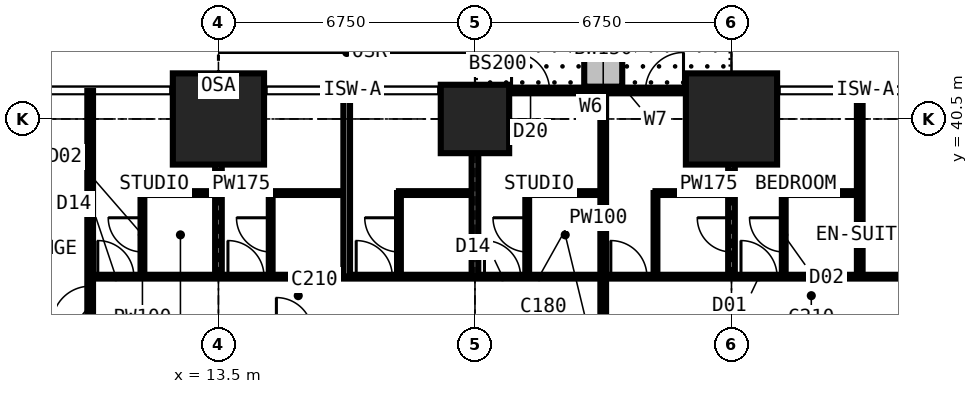
"""IFC4 building model, lengths in metres.
Left out: names, types, materials, properties, quantities, classifications, styles, units other than length and angle.
Written with IfcOpenShell. Run it as: python <this file> out.ifc"""

import sys

from ifc_helpers import new_model, si_unit, direction, frame, frame_2d, origin, origin_2d, place, context, subcontext, project, spatial, rectangle, extrude, element, fill, save


model = new_model("IFC4")
c1 = context("Model", 3, precision=1e-05, world=origin(), true_north=direction((0.0, 1.0)))
c2 = subcontext(c1, "Body", "Model", "MODEL_VIEW")
j1 = project(units=[si_unit("LENGTHUNIT", "METRE"), si_unit("PLANEANGLEUNIT", "RADIAN")], contexts=[c1])
p1 = place(None, origin())
s1 = spatial("IfcSite", under=j1, at=p1, CompositionType="ELEMENT")
p2 = place(p1, origin())
s2 = spatial("IfcBuilding", under=s1, at=p2, CompositionType="ELEMENT")
p3 = place(p2, frame((0.0, 0.0, 72.0)))
s3 = spatial("IfcBuildingStorey", under=s2, at=p3, CompositionType="ELEMENT", Elevation=72.0)
p4 = place(p3, frame((13.5, 40.5, 0.0), z_axis=(0.0, 0.0, 1.0), x_axis=(1.0, 0.0, 0.0)))
e1 = element("IfcColumn", 1, at=p4, inside=s3, PredefinedType="COLUMN", context=c2, shape_type="SweptSolid", body=[
    extrude(rectangle(XDim=2.4, YDim=2.4, at=origin_2d()), origin(), (0.0, 0.0, 1.0), 3.6),
])
p5 = place(p3, frame((20.25, 40.5, 0.0), z_axis=(0.0, 0.0, 1.0), x_axis=(1.0, 0.0, 0.0)))
e2 = element("IfcColumn", 2, at=p5, inside=s3, PredefinedType="COLUMN", context=c2, shape_type="SweptSolid", body=[
    extrude(rectangle(XDim=1.8, YDim=1.8, at=origin_2d()), origin(), (0.0, 0.0, 1.0), 3.6),
])
p6 = place(p3, frame((27.0, 40.5, 0.0), z_axis=(0.0, 0.0, 1.0), x_axis=(1.0, 0.0, 0.0)))
e3 = element("IfcColumn", 3, at=p6, inside=s3, PredefinedType="COLUMN", context=c2, shape_type="SweptSolid", body=[
    extrude(rectangle(XDim=2.4, YDim=2.4, at=origin_2d()), origin(), (0.0, 0.0, 1.0), 3.6),
])
p7 = place(p3, frame((20.25, 41.25, 0.0), z_axis=(0.0, 0.0, 1.0), x_axis=(1.0, 0.0, 0.0)))
e4 = element("IfcWall", 4, at=p7, inside=s3, PredefinedType="SOLIDWALL", context=c2, shape_type="SweptSolid", body=[
    extrude(rectangle(XDim=6.75, YDim=0.15, at=frame_2d((3.375, 0.0))), origin(), (0.0, 0.0, 1.0), 3.3),
])
p8 = place(p7, frame((0.962, 0.0, 0.0)))
e5 = element("IfcOpeningElement", 5, at=p8, cuts=e4, PredefinedType="OPENING", context=c2, shape_type="SweptSolid", body=[
    extrude(rectangle(XDim=1.0, YDim=2.2, at=frame_2d((0.5, 1.1))), frame((0.0, 0.085, 0.0), z_axis=(0.0, -1.0, 0.0), x_axis=(1.0, 0.0, 0.0)), (0.0, 0.0, 1.0), 0.17),
])
p9 = place(p7, frame((2.025, 0.0, 0.9)))
e6 = element("IfcOpeningElement", 6, at=p9, cuts=e4, PredefinedType="OPENING", context=c2, shape_type="SweptSolid", body=[
    extrude(rectangle(XDim=1.2, YDim=1.8, at=frame_2d((0.6, 0.9))), frame((0.0, 0.085, 0.0), z_axis=(0.0, -1.0, 0.0), x_axis=(1.0, 0.0, 0.0)), (0.0, 0.0, 1.0), 0.17),
])
p10 = place(p7, frame((4.488, 0.0, 0.0)))
e7 = element("IfcOpeningElement", 7, at=p10, cuts=e4, PredefinedType="OPENING", context=c2, shape_type="SweptSolid", body=[
    extrude(rectangle(XDim=1.0, YDim=2.2, at=frame_2d((0.5, 1.1))), frame((0.0, 0.085, 0.0), z_axis=(0.0, -1.0, 0.0), x_axis=(1.0, 0.0, 0.0)), (0.0, 0.0, 1.0), 0.17),
])
p11 = place(p7, frame((3.525, 0.0, 0.9)))
e8 = element("IfcOpeningElement", 8, at=p11, cuts=e4, PredefinedType="OPENING", context=c2, shape_type="SweptSolid", body=[
    extrude(rectangle(XDim=0.9, YDim=1.8, at=frame_2d((0.45, 0.9))), frame((0.0, 0.085, 0.0), z_axis=(0.0, -1.0, 0.0), x_axis=(1.0, 0.0, 0.0)), (0.0, 0.0, 1.0), 0.17),
])
p12 = place(p3, frame((23.625, 41.35, 0.0), z_axis=(0.0, 0.0, 1.0), x_axis=(0.0, 1.0, 0.0)))
e9 = element("IfcWall", 9, at=p12, inside=s3, PredefinedType="USERDEFINED", context=c2, shape_type="SweptSolid", body=[
    extrude(rectangle(XDim=2.2, YDim=1.0, at=frame_2d((1.1, 0.0))), origin(), (0.0, 0.0, 1.0), 0.9),
])
p13 = place(p3, frame((10.125, 30.375, 0.0), z_axis=(0.0, 0.0, 1.0), x_axis=(0.0, 1.0, 0.0)))
e10 = element("IfcWall", 10, at=p13, inside=s3, PredefinedType="PARTITIONING", context=c2, shape_type="SweptSolid", body=[
    extrude(rectangle(XDim=10.859, YDim=0.15, at=frame_2d((5.429, 0.0))), origin(), (0.0, 0.0, 1.0), 3.3),
])
p14 = place(p13, frame((4.725, 0.0, 0.0)))
e11 = element("IfcOpeningElement", 11, at=p14, cuts=e10, PredefinedType="OPENING", context=c2, shape_type="SweptSolid", body=[
    extrude(rectangle(XDim=1.0, YDim=2.2, at=frame_2d((0.5, 1.1))), frame((0.0, 0.085, 0.0), z_axis=(0.0, -1.0, 0.0), x_axis=(1.0, 0.0, 0.0)), (0.0, 0.0, 1.0), 0.17),
])
p15 = place(p3, frame((10.125, 36.35, 0.0), z_axis=(0.0, 0.0, 1.0), x_axis=(1.0, 0.0, 0.0)))
e12 = element("IfcWall", 12, at=p15, inside=s3, PredefinedType="PARTITIONING", context=c2, shape_type="SweptSolid", body=[
    extrude(rectangle(XDim=23.625, YDim=0.1, at=frame_2d((11.812, 0.0))), origin(), (0.0, 0.0, 1.0), 3.3),
])
p16 = place(p15, frame((21.45, 0.0, 0.0)))
e13 = element("IfcOpeningElement", 13, at=p16, cuts=e12, PredefinedType="OPENING", context=c2, shape_type="SweptSolid", body=[
    extrude(rectangle(XDim=1.0, YDim=2.2, at=frame_2d((0.5, 1.1))), frame((0.0, 0.06, 0.0), z_axis=(0.0, -1.0, 0.0), x_axis=(1.0, 0.0, 0.0)), (0.0, 0.0, 1.0), 0.12),
])
p17 = place(p15, frame((17.125, 0.0, 0.0)))
e14 = element("IfcOpeningElement", 14, at=p17, cuts=e12, PredefinedType="OPENING", context=c2, shape_type="SweptSolid", body=[
    extrude(rectangle(XDim=0.95, YDim=2.2, at=frame_2d((0.475, 1.1))), frame((0.0, 0.06, 0.0), z_axis=(0.0, -1.0, 0.0), x_axis=(1.0, 0.0, 0.0)), (0.0, 0.0, 1.0), 0.12),
])
p18 = place(p15, frame((13.7, 0.0, 0.0)))
e15 = element("IfcOpeningElement", 15, at=p18, cuts=e12, PredefinedType="OPENING", context=c2, shape_type="SweptSolid", body=[
    extrude(rectangle(XDim=0.95, YDim=2.2, at=frame_2d((0.475, 1.1))), frame((0.0, 0.06, 0.0), z_axis=(0.0, -1.0, 0.0), x_axis=(1.0, 0.0, 0.0)), (0.0, 0.0, 1.0), 0.12),
])
p19 = place(p15, frame((0.2, 0.0, 0.0)))
e16 = element("IfcOpeningElement", 16, at=p19, cuts=e12, PredefinedType="OPENING", context=c2, shape_type="SweptSolid", body=[
    extrude(rectangle(XDim=0.95, YDim=2.2, at=frame_2d((0.475, 1.1))), frame((0.0, 0.06, 0.0), z_axis=(0.0, -1.0, 0.0), x_axis=(1.0, 0.0, 0.0)), (0.0, 0.0, 1.0), 0.12),
])
p20 = place(p15, frame((3.625, 0.0, 0.0)))
e17 = element("IfcOpeningElement", 17, at=p20, cuts=e12, PredefinedType="OPENING", context=c2, shape_type="SweptSolid", body=[
    extrude(rectangle(XDim=0.95, YDim=2.2, at=frame_2d((0.475, 1.1))), frame((0.0, 0.06, 0.0), z_axis=(0.0, -1.0, 0.0), x_axis=(1.0, 0.0, 0.0)), (0.0, 0.0, 1.0), 0.12),
])
p21 = place(p15, frame((7.0, 0.0, 0.0)))
e18 = element("IfcOpeningElement", 18, at=p21, cuts=e12, PredefinedType="OPENING", context=c2, shape_type="SweptSolid", body=[
    extrude(rectangle(XDim=0.95, YDim=2.2, at=frame_2d((0.475, 1.1))), frame((0.0, 0.06, 0.0), z_axis=(0.0, -1.0, 0.0), x_axis=(1.0, 0.0, 0.0)), (0.0, 0.0, 1.0), 0.12),
])
p22 = place(p15, frame((10.375, 0.0, 0.0)))
e19 = element("IfcOpeningElement", 19, at=p22, cuts=e12, PredefinedType="OPENING", context=c2, shape_type="SweptSolid", body=[
    extrude(rectangle(XDim=0.95, YDim=2.2, at=frame_2d((0.475, 1.1))), frame((0.0, 0.06, 0.0), z_axis=(0.0, -1.0, 0.0), x_axis=(1.0, 0.0, 0.0)), (0.0, 0.0, 1.0), 0.12),
])
p23 = place(p3, frame((11.5, 36.35, 0.0), z_axis=(0.0, 0.0, 1.0), x_axis=(0.0, 1.0, 0.0)))
e20 = element("IfcWall", 20, at=p23, inside=s3, PredefinedType="PARTITIONING", context=c2, shape_type="SweptSolid", body=[
    extrude(rectangle(XDim=2.2, YDim=0.1, at=frame_2d((1.1, 0.0))), origin(), (0.0, 0.0, 1.0), 3.3),
])
p24 = place(p23, frame((0.65, 0.0, 0.0)))
e21 = element("IfcOpeningElement", 21, at=p24, cuts=e20, PredefinedType="OPENING", context=c2, shape_type="SweptSolid", body=[
    extrude(rectangle(XDim=0.9, YDim=2.2, at=frame_2d((0.45, 1.1))), frame((0.0, 0.06, 0.0), z_axis=(0.0, -1.0, 0.0), x_axis=(1.0, 0.0, 0.0)), (0.0, 0.0, 1.0), 0.12),
])
p25 = place(p3, frame((11.5, 38.55, 0.0), z_axis=(0.0, 0.0, 1.0), x_axis=(1.0, 0.0, 0.0)))
e22 = element("IfcWall", 22, at=p25, inside=s3, PredefinedType="PARTITIONING", context=c2, shape_type="SweptSolid", body=[
    extrude(rectangle(XDim=2.0, YDim=0.1, at=frame_2d((1.0, 0.0))), origin(), (0.0, 0.0, 1.0), 3.3),
])
p26 = place(p3, frame((13.5, 36.35, 0.0), z_axis=(0.0, 0.0, 1.0), x_axis=(0.0, 1.0, 0.0)))
e23 = element("IfcWall", 23, at=p26, inside=s3, PredefinedType="PARTITIONING", context=c2, shape_type="SweptSolid", body=[
    extrude(rectangle(XDim=4.884, YDim=0.175, at=frame_2d((2.442, 0.0))), origin(), (0.0, 0.0, 1.0), 2.802),
])
p27 = place(p3, frame((14.875, 36.35, 0.0), z_axis=(0.0, 0.0, 1.0), x_axis=(0.0, 1.0, 0.0)))
e24 = element("IfcWall", 24, at=p27, inside=s3, PredefinedType="PARTITIONING", context=c2, shape_type="SweptSolid", body=[
    extrude(rectangle(XDim=2.2, YDim=0.1, at=frame_2d((1.1, 0.0))), origin(), (0.0, 0.0, 1.0), 3.3),
])
p28 = place(p27, frame((0.65, 0.0, 0.0)))
e25 = element("IfcOpeningElement", 25, at=p28, cuts=e24, PredefinedType="OPENING", context=c2, shape_type="SweptSolid", body=[
    extrude(rectangle(XDim=0.9, YDim=2.2, at=frame_2d((0.45, 1.1))), frame((0.0, 0.06, 0.0), z_axis=(0.0, -1.0, 0.0), x_axis=(1.0, 0.0, 0.0)), (0.0, 0.0, 1.0), 0.12),
])
p29 = place(p3, frame((14.875, 38.55, 0.0), z_axis=(0.0, 0.0, 1.0), x_axis=(1.0, 0.0, 0.0)))
e26 = element("IfcWall", 26, at=p29, inside=s3, PredefinedType="PARTITIONING", context=c2, shape_type="SweptSolid", body=[
    extrude(rectangle(XDim=2.0, YDim=0.1, at=frame_2d((1.0, 0.0))), origin(), (0.0, 0.0, 1.0), 3.3),
])
p30 = place(p3, frame((16.875, 36.35, 0.0), z_axis=(0.0, 0.0, 1.0), x_axis=(0.0, 1.0, 0.0)))
e27 = element("IfcWall", 27, at=p30, inside=s3, PredefinedType="PARTITIONING", context=c2, shape_type="SweptSolid", body=[
    extrude(rectangle(XDim=4.884, YDim=0.175, at=frame_2d((2.442, 0.0))), origin(), (0.0, 0.0, 1.0), 3.3),
])
p31 = place(p3, frame((18.25, 36.35, 0.0), z_axis=(0.0, 0.0, 1.0), x_axis=(0.0, 1.0, 0.0)))
e28 = element("IfcWall", 28, at=p31, inside=s3, PredefinedType="PARTITIONING", context=c2, shape_type="SweptSolid", body=[
    extrude(rectangle(XDim=2.2, YDim=0.1, at=frame_2d((1.1, 0.0))), origin(), (0.0, 0.0, 1.0), 3.3),
])
p32 = place(p31, frame((0.65, 0.0, 0.0)))
e29 = element("IfcOpeningElement", 29, at=p32, cuts=e28, PredefinedType="OPENING", context=c2, shape_type="SweptSolid", body=[
    extrude(rectangle(XDim=0.9, YDim=2.2, at=frame_2d((0.45, 1.1))), frame((0.0, 0.06, 0.0), z_axis=(0.0, -1.0, 0.0), x_axis=(1.0, 0.0, 0.0)), (0.0, 0.0, 1.0), 0.12),
])
p33 = place(p3, frame((18.25, 38.55, 0.0), z_axis=(0.0, 0.0, 1.0), x_axis=(1.0, 0.0, 0.0)))
e30 = element("IfcWall", 30, at=p33, inside=s3, PredefinedType="PARTITIONING", context=c2, shape_type="SweptSolid", body=[
    extrude(rectangle(XDim=2.0, YDim=0.1, at=frame_2d((1.0, 0.0))), origin(), (0.0, 0.0, 1.0), 3.3),
])
p34 = place(p3, frame((20.25, 36.35, 0.0), z_axis=(0.0, 0.0, 1.0), x_axis=(0.0, 1.0, 0.0)))
e31 = element("IfcWall", 31, at=p34, inside=s3, PredefinedType="PARTITIONING", context=c2, shape_type="SweptSolid", body=[
    extrude(rectangle(XDim=4.884, YDim=0.175, at=frame_2d((2.442, 0.0))), origin(), (0.0, 0.0, 1.0), 2.731),
])
p35 = place(p3, frame((21.625, 36.35, 0.0), z_axis=(0.0, 0.0, 1.0), x_axis=(0.0, 1.0, 0.0)))
e32 = element("IfcWall", 32, at=p35, inside=s3, PredefinedType="PARTITIONING", context=c2, shape_type="SweptSolid", body=[
    extrude(rectangle(XDim=2.2, YDim=0.1, at=frame_2d((1.1, 0.0))), origin(), (0.0, 0.0, 1.0), 3.3),
])
p36 = place(p35, frame((0.65, 0.0, 0.0)))
e33 = element("IfcOpeningElement", 33, at=p36, cuts=e32, PredefinedType="OPENING", context=c2, shape_type="SweptSolid", body=[
    extrude(rectangle(XDim=0.9, YDim=2.2, at=frame_2d((0.45, 1.1))), frame((0.0, 0.06, 0.0), z_axis=(0.0, -1.0, 0.0), x_axis=(1.0, 0.0, 0.0)), (0.0, 0.0, 1.0), 0.12),
])
p37 = place(p3, frame((21.625, 38.55, 0.0), z_axis=(0.0, 0.0, 1.0), x_axis=(1.0, 0.0, 0.0)))
e34 = element("IfcWall", 34, at=p37, inside=s3, PredefinedType="PARTITIONING", context=c2, shape_type="SweptSolid", body=[
    extrude(rectangle(XDim=2.0, YDim=0.1, at=frame_2d((1.0, 0.0))), origin(), (0.0, 0.0, 1.0), 3.3),
])
p38 = place(p3, frame((23.625, 29.2, 0.0), z_axis=(0.0, 0.0, 1.0), x_axis=(0.0, 1.0, 0.0)))
e35 = element("IfcWall", 35, at=p38, inside=s3, PredefinedType="PARTITIONING", context=c2, shape_type="SweptSolid", body=[
    extrude(rectangle(XDim=12.034, YDim=0.15, at=frame_2d((6.017, 0.0))), origin(), (0.0, 0.0, 1.0), 3.3),
])
p39 = place(p3, frame((25.0, 36.35, 0.0), z_axis=(0.0, 0.0, 1.0), x_axis=(0.0, 1.0, 0.0)))
e36 = element("IfcWall", 36, at=p39, inside=s3, PredefinedType="PARTITIONING", context=c2, shape_type="SweptSolid", body=[
    extrude(rectangle(XDim=2.2, YDim=0.1, at=frame_2d((1.1, 0.0))), origin(), (0.0, 0.0, 1.0), 3.3),
])
p40 = place(p3, frame((25.0, 38.55, 0.0), z_axis=(0.0, 0.0, 1.0), x_axis=(1.0, 0.0, 0.0)))
e37 = element("IfcWall", 37, at=p40, inside=s3, PredefinedType="PARTITIONING", context=c2, shape_type="SweptSolid", body=[
    extrude(rectangle(XDim=2.0, YDim=0.1, at=frame_2d((1.0, 0.0))), origin(), (0.0, 0.0, 1.0), 3.3),
])
p41 = place(p3, frame((27.0, 36.35, 0.0), z_axis=(0.0, 0.0, 1.0), x_axis=(0.0, 1.0, 0.0)))
e38 = element("IfcWall", 38, at=p41, inside=s3, PredefinedType="PARTITIONING", context=c2, shape_type="SweptSolid", body=[
    extrude(rectangle(XDim=4.884, YDim=0.175, at=frame_2d((2.442, 0.0))), origin(), (0.0, 0.0, 1.0), 2.802),
])
p42 = place(p41, frame((0.65, 0.0, 0.0)))
e39 = element("IfcOpeningElement", 39, at=p42, cuts=e38, PredefinedType="OPENING", context=c2, shape_type="SweptSolid", body=[
    extrude(rectangle(XDim=0.9, YDim=2.2, at=frame_2d((0.45, 1.1))), frame((0.0, 0.097, 0.0), z_axis=(0.0, -1.0, 0.0), x_axis=(1.0, 0.0, 0.0)), (0.0, 0.0, 1.0), 0.195),
])
p43 = place(p3, frame((28.375, 36.35, 0.0), z_axis=(0.0, 0.0, 1.0), x_axis=(0.0, 1.0, 0.0)))
e40 = element("IfcWall", 40, at=p43, inside=s3, PredefinedType="PARTITIONING", context=c2, shape_type="SweptSolid", body=[
    extrude(rectangle(XDim=2.2, YDim=0.1, at=frame_2d((1.1, 0.0))), origin(), (0.0, 0.0, 1.0), 3.3),
])
p44 = place(p43, frame((0.65, 0.0, 0.0)))
e41 = element("IfcOpeningElement", 41, at=p44, cuts=e40, PredefinedType="OPENING", context=c2, shape_type="SweptSolid", body=[
    extrude(rectangle(XDim=0.9, YDim=2.2, at=frame_2d((0.45, 1.1))), frame((0.0, 0.06, 0.0), z_axis=(0.0, -1.0, 0.0), x_axis=(1.0, 0.0, 0.0)), (0.0, 0.0, 1.0), 0.12),
])
p45 = place(p3, frame((28.375, 38.55, 0.0), z_axis=(0.0, 0.0, 1.0), x_axis=(1.0, 0.0, 0.0)))
e42 = element("IfcWall", 42, at=p45, inside=s3, PredefinedType="PARTITIONING", context=c2, shape_type="SweptSolid", body=[
    extrude(rectangle(XDim=2.0, YDim=0.1, at=frame_2d((1.0, 0.0))), origin(), (0.0, 0.0, 1.0), 3.3),
])
p46 = place(p3, frame((30.375, 36.35, 0.0), z_axis=(0.0, 0.0, 1.0), x_axis=(0.0, 1.0, 0.0)))
e43 = element("IfcWall", 43, at=p46, inside=s3, PredefinedType="PARTITIONING", context=c2, shape_type="SweptSolid", body=[
    extrude(rectangle(XDim=4.884, YDim=0.15, at=frame_2d((2.442, 0.0))), origin(), (0.0, 0.0, 1.0), 3.3),
])
p47 = place(p8, origin())
e44 = element("IfcDoor", 44, at=p47, inside=s3, OperationType="SINGLE_SWING_LEFT", PredefinedType="DOOR", context=c2, shape_type="SweptSolid", body=[
    extrude(rectangle(XDim=1.0, YDim=2.2, at=frame_2d((0.5, 1.1))), frame((0.0, 0.025, 0.0), z_axis=(0.0, -1.0, 0.0), x_axis=(1.0, 0.0, 0.0)), (0.0, 0.0, 1.0), 0.05),
])
fill(e5, e44)
p48 = place(p9, origin())
e45 = element("IfcWindow", 45, at=p48, inside=s3, PartitioningType="SINGLE_PANEL", PredefinedType="WINDOW", context=c2, shape_type="SweptSolid", body=[
    extrude(rectangle(XDim=1.2, YDim=1.8, at=frame_2d((0.6, 0.9))), frame((0.0, 0.03, 0.0), z_axis=(0.0, -1.0, 0.0), x_axis=(1.0, 0.0, 0.0)), (0.0, 0.0, 1.0), 0.06),
])
fill(e6, e45)
p49 = place(p10, origin())
e46 = element("IfcDoor", 46, at=p49, inside=s3, OperationType="SINGLE_SWING_RIGHT", PredefinedType="DOOR", context=c2, shape_type="SweptSolid", body=[
    extrude(rectangle(XDim=1.0, YDim=2.2, at=frame_2d((0.5, 1.1))), frame((0.0, 0.025, 0.0), z_axis=(0.0, -1.0, 0.0), x_axis=(1.0, 0.0, 0.0)), (0.0, 0.0, 1.0), 0.05),
])
fill(e7, e46)
p50 = place(p11, origin())
e47 = element("IfcWindow", 47, at=p50, inside=s3, PartitioningType="SINGLE_PANEL", PredefinedType="WINDOW", context=c2, shape_type="SweptSolid", body=[
    extrude(rectangle(XDim=0.9, YDim=1.8, at=frame_2d((0.45, 0.9))), frame((0.0, 0.03, 0.0), z_axis=(0.0, -1.0, 0.0), x_axis=(1.0, 0.0, 0.0)), (0.0, 0.0, 1.0), 0.06),
])
fill(e8, e47)
p51 = place(p17, origin())
e48 = element("IfcDoor", 48, at=p51, inside=s3, OperationType="SINGLE_SWING_LEFT", PredefinedType="DOOR", context=c2, shape_type="SweptSolid", body=[
    extrude(rectangle(XDim=0.95, YDim=2.2, at=frame_2d((0.475, 1.1))), frame((0.0, 0.025, 0.0), z_axis=(0.0, -1.0, 0.0), x_axis=(1.0, 0.0, 0.0)), (0.0, 0.0, 1.0), 0.05),
])
fill(e14, e48)
p52 = place(p44, origin())
e49 = element("IfcDoor", 49, at=p52, inside=s3, OperationType="SINGLE_SWING_RIGHT", PredefinedType="DOOR", context=c2, shape_type="SweptSolid", body=[
    extrude(rectangle(XDim=0.9, YDim=2.2, at=frame_2d((0.45, 1.1))), frame((0.0, 0.025, 0.0), z_axis=(0.0, -1.0, 0.0), x_axis=(1.0, 0.0, 0.0)), (0.0, 0.0, 1.0), 0.05),
])
fill(e41, e49)
p53 = place(p18, origin())
e50 = element("IfcDoor", 50, at=p53, inside=s3, OperationType="SINGLE_SWING_LEFT", PredefinedType="DOOR", context=c2, shape_type="SweptSolid", body=[
    extrude(rectangle(XDim=0.95, YDim=2.2, at=frame_2d((0.475, 1.1))), frame((0.0, 0.025, 0.0), z_axis=(0.0, -1.0, 0.0), x_axis=(1.0, 0.0, 0.0)), (0.0, 0.0, 1.0), 0.05),
])
fill(e15, e50)
p54 = place(p42, origin())
e51 = element("IfcDoor", 51, at=p54, inside=s3, OperationType="SINGLE_SWING_RIGHT", PredefinedType="DOOR", context=c2, shape_type="SweptSolid", body=[
    extrude(rectangle(XDim=0.9, YDim=2.2, at=frame_2d((0.45, 1.1))), frame((0.0, 0.025, 0.0), z_axis=(0.0, -1.0, 0.0), x_axis=(1.0, 0.0, 0.0)), (0.0, 0.0, 1.0), 0.05),
])
fill(e39, e51)
p55 = place(p19, origin())
e52 = element("IfcDoor", 52, at=p55, inside=s3, OperationType="SINGLE_SWING_LEFT", PredefinedType="DOOR", context=c2, shape_type="SweptSolid", body=[
    extrude(rectangle(XDim=0.95, YDim=2.2, at=frame_2d((0.475, 1.1))), frame((0.0, 0.025, 0.0), z_axis=(0.0, -1.0, 0.0), x_axis=(1.0, 0.0, 0.0)), (0.0, 0.0, 1.0), 0.05),
])
fill(e16, e52)
p56 = place(p24, origin())
e53 = element("IfcDoor", 53, at=p56, inside=s3, OperationType="SINGLE_SWING_RIGHT", PredefinedType="DOOR", context=c2, shape_type="SweptSolid", body=[
    extrude(rectangle(XDim=0.9, YDim=2.2, at=frame_2d((0.45, 1.1))), frame((0.0, 0.025, 0.0), z_axis=(0.0, -1.0, 0.0), x_axis=(1.0, 0.0, 0.0)), (0.0, 0.0, 1.0), 0.05),
])
fill(e21, e53)
p57 = place(p20, origin())
e54 = element("IfcDoor", 54, at=p57, inside=s3, OperationType="SINGLE_SWING_LEFT", PredefinedType="DOOR", context=c2, shape_type="SweptSolid", body=[
    extrude(rectangle(XDim=0.95, YDim=2.2, at=frame_2d((0.475, 1.1))), frame((0.0, 0.025, 0.0), z_axis=(0.0, -1.0, 0.0), x_axis=(1.0, 0.0, 0.0)), (0.0, 0.0, 1.0), 0.05),
])
fill(e17, e54)
p58 = place(p28, origin())
e55 = element("IfcDoor", 55, at=p58, inside=s3, OperationType="SINGLE_SWING_RIGHT", PredefinedType="DOOR", context=c2, shape_type="SweptSolid", body=[
    extrude(rectangle(XDim=0.9, YDim=2.2, at=frame_2d((0.45, 1.1))), frame((0.0, 0.025, 0.0), z_axis=(0.0, -1.0, 0.0), x_axis=(1.0, 0.0, 0.0)), (0.0, 0.0, 1.0), 0.05),
])
fill(e25, e55)
p59 = place(p21, origin())
e56 = element("IfcDoor", 56, at=p59, inside=s3, OperationType="SINGLE_SWING_LEFT", PredefinedType="DOOR", context=c2, shape_type="SweptSolid", body=[
    extrude(rectangle(XDim=0.95, YDim=2.2, at=frame_2d((0.475, 1.1))), frame((0.0, 0.025, 0.0), z_axis=(0.0, -1.0, 0.0), x_axis=(1.0, 0.0, 0.0)), (0.0, 0.0, 1.0), 0.05),
])
fill(e18, e56)
p60 = place(p32, origin())
e57 = element("IfcDoor", 57, at=p60, inside=s3, OperationType="SINGLE_SWING_RIGHT", PredefinedType="DOOR", context=c2, shape_type="SweptSolid", body=[
    extrude(rectangle(XDim=0.9, YDim=2.2, at=frame_2d((0.45, 1.1))), frame((0.0, 0.025, 0.0), z_axis=(0.0, -1.0, 0.0), x_axis=(1.0, 0.0, 0.0)), (0.0, 0.0, 1.0), 0.05),
])
fill(e29, e57)
p61 = place(p22, origin())
e58 = element("IfcDoor", 58, at=p61, inside=s3, OperationType="SINGLE_SWING_LEFT", PredefinedType="DOOR", context=c2, shape_type="SweptSolid", body=[
    extrude(rectangle(XDim=0.95, YDim=2.2, at=frame_2d((0.475, 1.1))), frame((0.0, 0.025, 0.0), z_axis=(0.0, -1.0, 0.0), x_axis=(1.0, 0.0, 0.0)), (0.0, 0.0, 1.0), 0.05),
])
fill(e19, e58)
p62 = place(p36, origin())
e59 = element("IfcDoor", 59, at=p62, inside=s3, OperationType="SINGLE_SWING_RIGHT", PredefinedType="DOOR", context=c2, shape_type="SweptSolid", body=[
    extrude(rectangle(XDim=0.9, YDim=2.2, at=frame_2d((0.45, 1.1))), frame((0.0, 0.025, 0.0), z_axis=(0.0, -1.0, 0.0), x_axis=(1.0, 0.0, 0.0)), (0.0, 0.0, 1.0), 0.05),
])
fill(e33, e59)
p63 = place(p14, origin())
e60 = element("IfcDoor", 60, at=p63, inside=s3, OperationType="SINGLE_SWING_LEFT", PredefinedType="DOOR", context=c2, shape_type="SweptSolid", body=[
    extrude(rectangle(XDim=1.0, YDim=2.2, at=frame_2d((0.5, 1.1))), frame((0.0, 0.025, 0.0), z_axis=(0.0, -1.0, 0.0), x_axis=(1.0, 0.0, 0.0)), (0.0, 0.0, 1.0), 0.05),
])
fill(e11, e60)
save(model, sys.argv[1])
